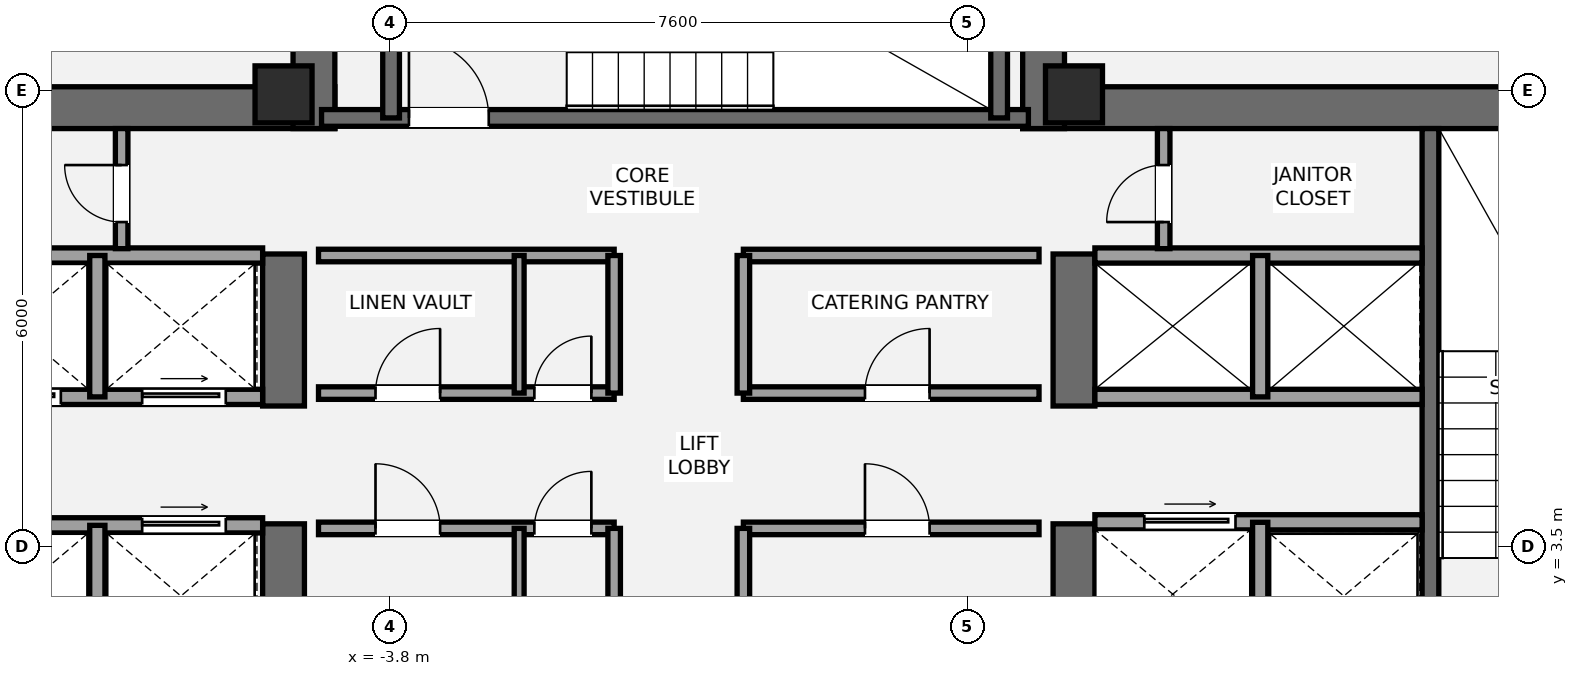
"""IFC4 building model, lengths in metres.
Left out: names, types, materials, properties, quantities, classifications, styles, units other than length and angle.
Written with IfcOpenShell. Run it as: python <this file> out.ifc"""

import sys

from ifc_helpers import new_model, si_unit, direction, frame, frame_2d, origin, origin_2d, place, context, subcontext, project, spatial, rectangle, extrude, element, fill, save


model = new_model("IFC4")
c1 = context("Model", 3, precision=1e-05, world=origin(), true_north=direction((0.0, 1.0)))
c2 = subcontext(c1, "Body", "Model", "MODEL_VIEW")
j1 = project(units=[si_unit("LENGTHUNIT", "METRE"), si_unit("PLANEANGLEUNIT", "RADIAN")], contexts=[c1])
p1 = place(None, origin())
s1 = spatial("IfcSite", under=j1, at=p1, CompositionType="ELEMENT")
p2 = place(p1, origin())
s2 = spatial("IfcBuilding", under=s1, at=p2, CompositionType="ELEMENT")
p3 = place(p2, frame((0.0, 0.0, 238.35)))
s3 = spatial("IfcBuildingStorey", under=s2, at=p3, CompositionType="ELEMENT", Elevation=238.35)
p4 = place(p3, frame((-13.7, 9.275, 0.0), z_axis=(0.0, 0.0, 1.0), x_axis=(1.0, 0.0, 0.0)))
e1 = element("IfcWall", 1, at=p4, inside=s3, PredefinedType="SHEAR", context=c2, shape_type="SweptSolid", body=[
    extrude(rectangle(XDim=9.175, YDim=0.55, at=frame_2d((4.587, 0.0))), origin(), (0.0, 0.0, 1.0), 3.15),
])
p5 = place(p3, frame((-5.2, 1.3, 0.0), z_axis=(0.0, 0.0, 1.0), x_axis=(0.0, 1.0, 0.0)))
e2 = element("IfcWall", 2, at=p5, inside=s3, PredefinedType="SHEAR", context=c2, shape_type="SweptSolid", body=[
    extrude(rectangle(XDim=2.5, YDim=0.55, at=frame_2d((1.25, 0.0))), origin(), (0.0, 0.0, 1.0), 3.15),
])
p6 = place(p3, frame((-5.2, 5.35, 0.0), z_axis=(0.0, 0.0, 1.0), x_axis=(0.0, 1.0, 0.0)))
e3 = element("IfcWall", 3, at=p6, inside=s3, PredefinedType="SHEAR", context=c2, shape_type="SweptSolid", body=[
    extrude(rectangle(XDim=2.0, YDim=0.55, at=frame_2d((1.0, 0.0))), origin(), (0.0, 0.0, 1.0), 3.15),
])
p7 = place(p3, frame((4.525, 9.275, 0.0), z_axis=(0.0, 0.0, 1.0), x_axis=(1.0, 0.0, 0.0)))
e4 = element("IfcWall", 4, at=p7, inside=s3, PredefinedType="SHEAR", context=c2, shape_type="SweptSolid", body=[
    extrude(rectangle(XDim=9.175, YDim=0.55, at=frame_2d((4.587, 0.0))), origin(), (0.0, 0.0, 1.0), 3.15),
])
p8 = place(p3, frame((5.2, 1.3, 0.0), z_axis=(0.0, 0.0, 1.0), x_axis=(0.0, 1.0, 0.0)))
e5 = element("IfcWall", 5, at=p8, inside=s3, PredefinedType="SHEAR", context=c2, shape_type="SweptSolid", body=[
    extrude(rectangle(XDim=2.5, YDim=0.55, at=frame_2d((1.25, 0.0))), origin(), (0.0, 0.0, 1.0), 3.15),
])
p9 = place(p3, frame((5.2, 5.35, 0.0), z_axis=(0.0, 0.0, 1.0), x_axis=(0.0, 1.0, 0.0)))
e6 = element("IfcWall", 6, at=p9, inside=s3, PredefinedType="SHEAR", context=c2, shape_type="SweptSolid", body=[
    extrude(rectangle(XDim=2.0, YDim=0.55, at=frame_2d((1.0, 0.0))), origin(), (0.0, 0.0, 1.0), 3.15),
])
p10 = place(p3, frame((9.89, 1.85, 0.0), z_axis=(0.0, 0.0, 1.0), x_axis=(0.0, 1.0, 0.0)))
e7 = element("IfcWall", 7, at=p10, inside=s3, PredefinedType="SHEAR", context=c2, shape_type="SweptSolid", body=[
    extrude(rectangle(XDim=7.15, YDim=0.22, at=frame_2d((3.575, 0.0))), origin(), (0.0, 0.0, 1.0), 3.15),
])
for number, where, z_axis, x_axis in (
    (8, (-4.8, 9.0, 0.0), (0.0, 0.0, 1.0), (0.0, 1.0, 0.0)),
    (9, (4.8, 9.0, 0.0), (0.0, 0.0, 1.0), (0.0, 1.0, 0.0)),
):
    element("IfcWall", number, at=place(p3, frame(where, z_axis=z_axis, x_axis=x_axis)), inside=s3, PredefinedType="SHEAR", context=c2, shape_type="SweptSolid", body=[
        extrude(rectangle(XDim=3.95, YDim=0.55, at=frame_2d((1.975, 0.0))), origin(), (0.0, 0.0, 1.0), 3.15),
    ])
p11 = place(p3, frame((-4.7, 9.14, 0.0), z_axis=(0.0, 0.0, 1.0), x_axis=(1.0, 0.0, 0.0)))
e10 = element("IfcWall", 10, at=p11, inside=s3, PredefinedType="SHEAR", context=c2, shape_type="SweptSolid", body=[
    extrude(rectangle(XDim=9.3, YDim=0.22, at=frame_2d((4.65, 0.0))), origin(), (0.0, 0.0, 1.0), 3.15),
])
p12 = place(p11, frame((1.15, 0.0, 0.0)))
e11 = element("IfcOpeningElement", 11, at=p12, cuts=e10, PredefinedType="OPENING", context=c2, shape_type="SweptSolid", body=[
    extrude(rectangle(XDim=1.05, YDim=2.15, at=frame_2d((0.525, 1.075))), frame((0.0, 0.12, 0.0), z_axis=(0.0, -1.0, 0.0), x_axis=(1.0, 0.0, 0.0)), (0.0, 0.0, 1.0), 0.24),
])
for number, where, z_axis, x_axis in (
    (12, (-3.785, 9.14, 0.0), (0.0, 0.0, 1.0), (0.0, 1.0, 0.0)),
    (13, (4.215, 9.14, 0.0), (0.0, 0.0, 1.0), (0.0, 1.0, 0.0)),
):
    element("IfcWall", number, at=place(p3, frame(where, z_axis=z_axis, x_axis=x_axis)), inside=s3, PredefinedType="SHEAR", context=c2, shape_type="SweptSolid", body=[
        extrude(rectangle(XDim=3.26, YDim=0.22, at=frame_2d((1.63, 0.0))), origin(), (0.0, 0.0, 1.0), 3.15),
    ])
for number, where, z_axis, x_axis in (
    (14, (-5.2, 9.45, 0.0), (0.0, 0.0, 1.0), (1.0, 0.0, 0.0)),
    (15, (5.2, 9.45, 0.0), (0.0, 0.0, 1.0), (1.0, 0.0, 0.0)),
):
    element("IfcColumn", number, at=place(p3, frame(where, z_axis=z_axis, x_axis=x_axis)), inside=s3, PredefinedType="PILASTER", context=c2, shape_type="SweptSolid", body=[
        extrude(rectangle(XDim=0.75, YDim=0.75, at=origin_2d()), origin(), (0.0, 0.0, 1.0), 3.15),
    ])
p13 = place(p3, frame((-9.78, 3.78, 0.0), z_axis=(0.0, 0.0, 1.0), x_axis=(1.0, 0.0, 0.0)))
e16 = element("IfcWall", 16, at=p13, inside=s3, PredefinedType="SOLIDWALL", context=c2, shape_type="SweptSolid", body=[
    extrude(rectangle(XDim=4.305, YDim=0.2, at=frame_2d((2.152, 0.0))), origin(), (0.0, 0.0, 1.0), 2.97),
])
p14 = place(p13, frame((2.72, 0.0, 0.0)))
e17 = element("IfcOpeningElement", 17, at=p14, cuts=e16, PredefinedType="OPENING", context=c2, shape_type="SweptSolid", body=[
    extrude(rectangle(XDim=1.1, YDim=2.2, at=frame_2d((0.55, 1.1))), frame((0.0, 0.11, 0.0), z_axis=(0.0, -1.0, 0.0), x_axis=(1.0, 0.0, 0.0)), (0.0, 0.0, 1.0), 0.22),
])
p15 = place(p3, frame((-7.65, 1.85, 0.0), z_axis=(0.0, 0.0, 1.0), x_axis=(0.0, 1.0, 0.0)))
e18 = element("IfcWall", 18, at=p15, inside=s3, PredefinedType="SOLIDWALL", context=c2, shape_type="SweptSolid", body=[
    extrude(rectangle(XDim=1.93, YDim=0.2, at=frame_2d((0.965, 0.0))), origin(), (0.0, 0.0, 1.0), 2.97),
])
p16 = place(p3, frame((-9.78, 5.47, 0.0), z_axis=(0.0, 0.0, 1.0), x_axis=(1.0, 0.0, 0.0)))
e19 = element("IfcWall", 19, at=p16, inside=s3, PredefinedType="SOLIDWALL", context=c2, shape_type="SweptSolid", body=[
    extrude(rectangle(XDim=4.305, YDim=0.2, at=frame_2d((2.152, 0.0))), origin(), (0.0, 0.0, 1.0), 2.97),
])
p17 = place(p16, frame((0.55, 0.0, 0.0)))
e20 = element("IfcOpeningElement", 20, at=p17, cuts=e19, PredefinedType="OPENING", context=c2, shape_type="SweptSolid", body=[
    extrude(rectangle(XDim=1.1, YDim=2.2, at=frame_2d((0.55, 1.1))), frame((0.0, 0.11, 0.0), z_axis=(0.0, -1.0, 0.0), x_axis=(1.0, 0.0, 0.0)), (0.0, 0.0, 1.0), 0.22),
])
p18 = place(p16, frame((2.72, 0.0, 0.0)))
e21 = element("IfcOpeningElement", 21, at=p18, cuts=e19, PredefinedType="OPENING", context=c2, shape_type="SweptSolid", body=[
    extrude(rectangle(XDim=1.1, YDim=2.2, at=frame_2d((0.55, 1.1))), frame((0.0, 0.11, 0.0), z_axis=(0.0, -1.0, 0.0), x_axis=(1.0, 0.0, 0.0)), (0.0, 0.0, 1.0), 0.22),
])
p19 = place(p3, frame((-9.78, 7.33, 0.0), z_axis=(0.0, 0.0, 1.0), x_axis=(1.0, 0.0, 0.0)))
e22 = element("IfcWall", 22, at=p19, inside=s3, PredefinedType="SOLIDWALL", context=c2, shape_type="SweptSolid", body=[
    extrude(rectangle(XDim=4.305, YDim=0.2, at=frame_2d((2.152, 0.0))), origin(), (0.0, 0.0, 1.0), 2.97),
])
p20 = place(p3, frame((-7.65, 5.47, 0.0), z_axis=(0.0, 0.0, 1.0), x_axis=(0.0, 1.0, 0.0)))
e23 = element("IfcWall", 23, at=p20, inside=s3, PredefinedType="SOLIDWALL", context=c2, shape_type="SweptSolid", body=[
    extrude(rectangle(XDim=1.86, YDim=0.2, at=frame_2d((0.93, 0.0))), origin(), (0.0, 0.0, 1.0), 2.97),
])
p21 = place(p3, frame((5.475, 3.82, 0.0), z_axis=(0.0, 0.0, 1.0), x_axis=(1.0, 0.0, 0.0)))
e24 = element("IfcWall", 24, at=p21, inside=s3, PredefinedType="SOLIDWALL", context=c2, shape_type="SweptSolid", body=[
    extrude(rectangle(XDim=4.305, YDim=0.2, at=frame_2d((2.152, 0.0))), origin(), (0.0, 0.0, 1.0), 2.97),
])
p22 = place(p21, frame((0.65, 0.0, 0.0)))
e25 = element("IfcOpeningElement", 25, at=p22, cuts=e24, PredefinedType="OPENING", context=c2, shape_type="SweptSolid", body=[
    extrude(rectangle(XDim=1.2, YDim=2.2, at=frame_2d((0.6, 1.1))), frame((0.0, 0.11, 0.0), z_axis=(0.0, -1.0, 0.0), x_axis=(1.0, 0.0, 0.0)), (0.0, 0.0, 1.0), 0.22),
])
p23 = place(p3, frame((7.65, 1.85, 0.0), z_axis=(0.0, 0.0, 1.0), x_axis=(0.0, 1.0, 0.0)))
e26 = element("IfcWall", 26, at=p23, inside=s3, PredefinedType="SOLIDWALL", context=c2, shape_type="SweptSolid", body=[
    extrude(rectangle(XDim=1.97, YDim=0.2, at=frame_2d((0.985, 0.0))), origin(), (0.0, 0.0, 1.0), 2.97),
])
for number, where, z_axis, x_axis in (
    (27, (5.475, 5.47, 0.0), (0.0, 0.0, 1.0), (1.0, 0.0, 0.0)),
    (28, (5.475, 7.33, 0.0), (0.0, 0.0, 1.0), (1.0, 0.0, 0.0)),
):
    element("IfcWall", number, at=place(p3, frame(where, z_axis=z_axis, x_axis=x_axis)), inside=s3, PredefinedType="SOLIDWALL", context=c2, shape_type="SweptSolid", body=[
        extrude(rectangle(XDim=4.305, YDim=0.2, at=frame_2d((2.152, 0.0))), origin(), (0.0, 0.0, 1.0), 2.97),
    ])
p24 = place(p3, frame((7.65, 5.47, 0.0), z_axis=(0.0, 0.0, 1.0), x_axis=(0.0, 1.0, 0.0)))
e29 = element("IfcWall", 29, at=p24, inside=s3, PredefinedType="SOLIDWALL", context=c2, shape_type="SweptSolid", body=[
    extrude(rectangle(XDim=1.86, YDim=0.2, at=frame_2d((0.93, 0.0))), origin(), (0.0, 0.0, 1.0), 2.97),
])
p25 = place(p3, frame((-4.74, 3.74, 0.0), z_axis=(0.0, 0.0, 1.0), x_axis=(1.0, 0.0, 0.0)))
e30 = element("IfcWall", 30, at=p25, inside=s3, PredefinedType="PARTITIONING", context=c2, shape_type="SweptSolid", body=[
    extrude(rectangle(XDim=3.89, YDim=0.165, at=frame_2d((1.945, 0.0))), origin(), (0.0, 0.0, 1.0), 2.97),
])
p26 = place(p25, frame((0.75, 0.0, 0.0)))
e31 = element("IfcOpeningElement", 31, at=p26, cuts=e30, PredefinedType="OPENING", context=c2, shape_type="SweptSolid", body=[
    extrude(rectangle(XDim=0.85, YDim=2.1, at=frame_2d((0.425, 1.05))), frame((0.0, 0.093, 0.0), z_axis=(0.0, -1.0, 0.0), x_axis=(1.0, 0.0, 0.0)), (0.0, 0.0, 1.0), 0.185),
])
p27 = place(p25, frame((2.84, 0.0, 0.0)))
e32 = element("IfcOpeningElement", 32, at=p27, cuts=e30, PredefinedType="OPENING", context=c2, shape_type="SweptSolid", body=[
    extrude(rectangle(XDim=0.75, YDim=2.1, at=frame_2d((0.375, 1.05))), frame((0.0, 0.093, 0.0), z_axis=(0.0, -1.0, 0.0), x_axis=(1.0, 0.0, 0.0)), (0.0, 0.0, 1.0), 0.185),
])
p28 = place(p3, frame((-0.85, 1.92, 0.0), z_axis=(0.0, 0.0, 1.0), x_axis=(0.0, 1.0, 0.0)))
e33 = element("IfcWall", 33, at=p28, inside=s3, PredefinedType="PARTITIONING", context=c2, shape_type="SweptSolid", body=[
    extrude(rectangle(XDim=1.82, YDim=0.165, at=frame_2d((0.91, 0.0))), origin(), (0.0, 0.0, 1.0), 2.97),
])
p29 = place(p3, frame((0.85, 3.74, 0.0), z_axis=(0.0, 0.0, 1.0), x_axis=(1.0, 0.0, 0.0)))
e34 = element("IfcWall", 34, at=p29, inside=s3, PredefinedType="PARTITIONING", context=c2, shape_type="SweptSolid", body=[
    extrude(rectangle(XDim=3.89, YDim=0.165, at=frame_2d((1.945, 0.0))), origin(), (0.0, 0.0, 1.0), 2.97),
])
p30 = place(p29, frame((1.6, 0.0, 0.0)))
e35 = element("IfcOpeningElement", 35, at=p30, cuts=e34, PredefinedType="OPENING", context=c2, shape_type="SweptSolid", body=[
    extrude(rectangle(XDim=0.85, YDim=2.1, at=frame_2d((0.425, 1.05))), frame((0.0, 0.093, 0.0), z_axis=(0.0, -1.0, 0.0), x_axis=(1.0, 0.0, 0.0)), (0.0, 0.0, 1.0), 0.185),
])
p31 = place(p3, frame((0.85, 1.92, 0.0), z_axis=(0.0, 0.0, 1.0), x_axis=(0.0, 1.0, 0.0)))
e36 = element("IfcWall", 36, at=p31, inside=s3, PredefinedType="PARTITIONING", context=c2, shape_type="SweptSolid", body=[
    extrude(rectangle(XDim=1.82, YDim=0.165, at=frame_2d((0.91, 0.0))), origin(), (0.0, 0.0, 1.0), 2.97),
])
p32 = place(p3, frame((-2.1, 1.92, 0.0), z_axis=(0.0, 0.0, 1.0), x_axis=(0.0, 1.0, 0.0)))
e37 = element("IfcWall", 37, at=p32, inside=s3, PredefinedType="PARTITIONING", context=c2, shape_type="SweptSolid", body=[
    extrude(rectangle(XDim=1.82, YDim=0.13, at=frame_2d((0.91, 0.0))), origin(), (0.0, 0.0, 1.0), 2.97),
])
p33 = place(p3, frame((-4.74, 5.52, 0.0), z_axis=(0.0, 0.0, 1.0), x_axis=(1.0, 0.0, 0.0)))
e38 = element("IfcWall", 38, at=p33, inside=s3, PredefinedType="PARTITIONING", context=c2, shape_type="SweptSolid", body=[
    extrude(rectangle(XDim=3.89, YDim=0.165, at=frame_2d((1.945, 0.0))), origin(), (0.0, 0.0, 1.0), 2.97),
])
p34 = place(p33, frame((0.75, 0.0, 0.0)))
e39 = element("IfcOpeningElement", 39, at=p34, cuts=e38, PredefinedType="OPENING", context=c2, shape_type="SweptSolid", body=[
    extrude(rectangle(XDim=0.85, YDim=2.1, at=frame_2d((0.425, 1.05))), frame((0.0, 0.093, 0.0), z_axis=(0.0, -1.0, 0.0), x_axis=(1.0, 0.0, 0.0)), (0.0, 0.0, 1.0), 0.185),
])
p35 = place(p33, frame((2.84, 0.0, 0.0)))
e40 = element("IfcOpeningElement", 40, at=p35, cuts=e38, PredefinedType="OPENING", context=c2, shape_type="SweptSolid", body=[
    extrude(rectangle(XDim=0.75, YDim=2.1, at=frame_2d((0.375, 1.05))), frame((0.0, 0.093, 0.0), z_axis=(0.0, -1.0, 0.0), x_axis=(1.0, 0.0, 0.0)), (0.0, 0.0, 1.0), 0.185),
])
p36 = place(p3, frame((-4.74, 7.33, 0.0), z_axis=(0.0, 0.0, 1.0), x_axis=(1.0, 0.0, 0.0)))
e41 = element("IfcWall", 41, at=p36, inside=s3, PredefinedType="PARTITIONING", context=c2, shape_type="SweptSolid", body=[
    extrude(rectangle(XDim=3.89, YDim=0.165, at=frame_2d((1.945, 0.0))), origin(), (0.0, 0.0, 1.0), 2.97),
])
p37 = place(p3, frame((-0.85, 5.52, 0.0), z_axis=(0.0, 0.0, 1.0), x_axis=(0.0, 1.0, 0.0)))
e42 = element("IfcWall", 42, at=p37, inside=s3, PredefinedType="PARTITIONING", context=c2, shape_type="SweptSolid", body=[
    extrude(rectangle(XDim=1.81, YDim=0.165, at=frame_2d((0.905, 0.0))), origin(), (0.0, 0.0, 1.0), 2.97),
])
p38 = place(p3, frame((0.85, 5.52, 0.0), z_axis=(0.0, 0.0, 1.0), x_axis=(1.0, 0.0, 0.0)))
e43 = element("IfcWall", 43, at=p38, inside=s3, PredefinedType="PARTITIONING", context=c2, shape_type="SweptSolid", body=[
    extrude(rectangle(XDim=3.89, YDim=0.165, at=frame_2d((1.945, 0.0))), origin(), (0.0, 0.0, 1.0), 2.97),
])
p39 = place(p38, frame((1.6, 0.0, 0.0)))
e44 = element("IfcOpeningElement", 44, at=p39, cuts=e43, PredefinedType="OPENING", context=c2, shape_type="SweptSolid", body=[
    extrude(rectangle(XDim=0.85, YDim=2.1, at=frame_2d((0.425, 1.05))), frame((0.0, 0.093, 0.0), z_axis=(0.0, -1.0, 0.0), x_axis=(1.0, 0.0, 0.0)), (0.0, 0.0, 1.0), 0.185),
])
p40 = place(p3, frame((0.85, 7.33, 0.0), z_axis=(0.0, 0.0, 1.0), x_axis=(1.0, 0.0, 0.0)))
e45 = element("IfcWall", 45, at=p40, inside=s3, PredefinedType="PARTITIONING", context=c2, shape_type="SweptSolid", body=[
    extrude(rectangle(XDim=3.89, YDim=0.165, at=frame_2d((1.945, 0.0))), origin(), (0.0, 0.0, 1.0), 2.97),
])
p41 = place(p3, frame((0.85, 5.52, 0.0), z_axis=(0.0, 0.0, 1.0), x_axis=(0.0, 1.0, 0.0)))
e46 = element("IfcWall", 46, at=p41, inside=s3, PredefinedType="PARTITIONING", context=c2, shape_type="SweptSolid", body=[
    extrude(rectangle(XDim=1.81, YDim=0.165, at=frame_2d((0.905, 0.0))), origin(), (0.0, 0.0, 1.0), 2.97),
])
p42 = place(p3, frame((-2.1, 5.52, 0.0), z_axis=(0.0, 0.0, 1.0), x_axis=(0.0, 1.0, 0.0)))
e47 = element("IfcWall", 47, at=p42, inside=s3, PredefinedType="PARTITIONING", context=c2, shape_type="SweptSolid", body=[
    extrude(rectangle(XDim=1.81, YDim=0.13, at=frame_2d((0.905, 0.0))), origin(), (0.0, 0.0, 1.0), 2.97),
])
p43 = place(p3, frame((-7.33, 7.42, 0.0), z_axis=(0.0, 0.0, 1.0), x_axis=(0.0, 1.0, 0.0)))
e48 = element("IfcWall", 48, at=p43, inside=s3, PredefinedType="PARTITIONING", context=c2, shape_type="SweptSolid", body=[
    extrude(rectangle(XDim=1.58, YDim=0.165, at=frame_2d((0.79, 0.0))), origin(), (0.0, 0.0, 1.0), 2.97),
])
p44 = place(p43, frame((0.35, 0.0, 0.0)))
e49 = element("IfcOpeningElement", 49, at=p44, cuts=e48, PredefinedType="OPENING", context=c2, shape_type="SweptSolid", body=[
    extrude(rectangle(XDim=0.75, YDim=2.1, at=frame_2d((0.375, 1.05))), frame((0.0, 0.093, 0.0), z_axis=(0.0, -1.0, 0.0), x_axis=(1.0, 0.0, 0.0)), (0.0, 0.0, 1.0), 0.185),
])
p45 = place(p3, frame((6.38, 7.42, 0.0), z_axis=(0.0, 0.0, 1.0), x_axis=(0.0, 1.0, 0.0)))
e50 = element("IfcWall", 50, at=p45, inside=s3, PredefinedType="PARTITIONING", context=c2, shape_type="SweptSolid", body=[
    extrude(rectangle(XDim=1.58, YDim=0.165, at=frame_2d((0.79, 0.0))), origin(), (0.0, 0.0, 1.0), 2.97),
])
p46 = place(p45, frame((0.35, 0.0, 0.0)))
e51 = element("IfcOpeningElement", 51, at=p46, cuts=e50, PredefinedType="OPENING", context=c2, shape_type="SweptSolid", body=[
    extrude(rectangle(XDim=0.75, YDim=2.1, at=frame_2d((0.375, 1.05))), frame((0.0, 0.093, 0.0), z_axis=(0.0, -1.0, 0.0), x_axis=(1.0, 0.0, 0.0)), (0.0, 0.0, 1.0), 0.185),
])
p47 = place(p12, origin())
e52 = element("IfcDoor", 52, at=p47, inside=s3, OperationType="SINGLE_SWING_LEFT", PredefinedType="DOOR", context=c2, shape_type="SweptSolid", body=[
    extrude(rectangle(XDim=1.05, YDim=2.15, at=frame_2d((0.525, 1.075))), frame((0.0, 0.025, 0.0), z_axis=(0.0, -1.0, 0.0), x_axis=(1.0, 0.0, 0.0)), (0.0, 0.0, 1.0), 0.05),
])
fill(e11, e52)
p48 = place(p17, origin())
e53 = element("IfcDoor", 53, at=p48, inside=s3, OperationType="SLIDING_TO_LEFT", PredefinedType="DOOR", context=c2, shape_type="SweptSolid", body=[
    extrude(rectangle(XDim=1.1, YDim=2.2, at=frame_2d((0.55, 1.1))), frame((0.0, 0.025, 0.0), z_axis=(0.0, -1.0, 0.0), x_axis=(1.0, 0.0, 0.0)), (0.0, 0.0, 1.0), 0.05),
])
fill(e20, e53)
p49 = place(p18, origin())
e54 = element("IfcDoor", 54, at=p49, inside=s3, OperationType="SLIDING_TO_LEFT", PredefinedType="DOOR", context=c2, shape_type="SweptSolid", body=[
    extrude(rectangle(XDim=1.1, YDim=2.2, at=frame_2d((0.55, 1.1))), frame((0.0, 0.025, 0.0), z_axis=(0.0, -1.0, 0.0), x_axis=(1.0, 0.0, 0.0)), (0.0, 0.0, 1.0), 0.05),
])
fill(e21, e54)
p50 = place(p14, origin())
e55 = element("IfcDoor", 55, at=p50, inside=s3, OperationType="SLIDING_TO_LEFT", PredefinedType="DOOR", context=c2, shape_type="SweptSolid", body=[
    extrude(rectangle(XDim=1.1, YDim=2.2, at=frame_2d((0.55, 1.1))), frame((0.0, 0.025, 0.0), z_axis=(0.0, -1.0, 0.0), x_axis=(1.0, 0.0, 0.0)), (0.0, 0.0, 1.0), 0.05),
])
fill(e17, e55)
p51 = place(p22, origin())
e56 = element("IfcDoor", 56, at=p51, inside=s3, OperationType="SLIDING_TO_RIGHT", PredefinedType="DOOR", context=c2, shape_type="SweptSolid", body=[
    extrude(rectangle(XDim=1.2, YDim=2.2, at=frame_2d((0.6, 1.1))), frame((0.0, 0.025, 0.0), z_axis=(0.0, -1.0, 0.0), x_axis=(1.0, 0.0, 0.0)), (0.0, 0.0, 1.0), 0.05),
])
fill(e25, e56)
p52 = place(p26, origin())
e57 = element("IfcDoor", 57, at=p52, inside=s3, OperationType="SINGLE_SWING_LEFT", PredefinedType="DOOR", context=c2, shape_type="SweptSolid", body=[
    extrude(rectangle(XDim=0.85, YDim=2.1, at=frame_2d((0.425, 1.05))), frame((0.0, 0.025, 0.0), z_axis=(0.0, -1.0, 0.0), x_axis=(1.0, 0.0, 0.0)), (0.0, 0.0, 1.0), 0.05),
])
fill(e31, e57)
p53 = place(p27, origin())
e58 = element("IfcDoor", 58, at=p53, inside=s3, OperationType="SINGLE_SWING_RIGHT", PredefinedType="DOOR", context=c2, shape_type="SweptSolid", body=[
    extrude(rectangle(XDim=0.75, YDim=2.1, at=frame_2d((0.375, 1.05))), frame((0.0, 0.025, 0.0), z_axis=(0.0, -1.0, 0.0), x_axis=(1.0, 0.0, 0.0)), (0.0, 0.0, 1.0), 0.05),
])
fill(e32, e58)
p54 = place(p30, origin())
e59 = element("IfcDoor", 59, at=p54, inside=s3, OperationType="SINGLE_SWING_LEFT", PredefinedType="DOOR", context=c2, shape_type="SweptSolid", body=[
    extrude(rectangle(XDim=0.85, YDim=2.1, at=frame_2d((0.425, 1.05))), frame((0.0, 0.025, 0.0), z_axis=(0.0, -1.0, 0.0), x_axis=(1.0, 0.0, 0.0)), (0.0, 0.0, 1.0), 0.05),
])
fill(e35, e59)
p55 = place(p34, origin())
e60 = element("IfcDoor", 60, at=p55, inside=s3, OperationType="SINGLE_SWING_RIGHT", PredefinedType="DOOR", context=c2, shape_type="SweptSolid", body=[
    extrude(rectangle(XDim=0.85, YDim=2.1, at=frame_2d((0.425, 1.05))), frame((0.0, 0.025, 0.0), z_axis=(0.0, -1.0, 0.0), x_axis=(1.0, 0.0, 0.0)), (0.0, 0.0, 1.0), 0.05),
])
fill(e39, e60)
p56 = place(p35, origin())
e61 = element("IfcDoor", 61, at=p56, inside=s3, OperationType="SINGLE_SWING_RIGHT", PredefinedType="DOOR", context=c2, shape_type="SweptSolid", body=[
    extrude(rectangle(XDim=0.75, YDim=2.1, at=frame_2d((0.375, 1.05))), frame((0.0, 0.025, 0.0), z_axis=(0.0, -1.0, 0.0), x_axis=(1.0, 0.0, 0.0)), (0.0, 0.0, 1.0), 0.05),
])
fill(e40, e61)
p57 = place(p39, origin())
e62 = element("IfcDoor", 62, at=p57, inside=s3, OperationType="SINGLE_SWING_RIGHT", PredefinedType="DOOR", context=c2, shape_type="SweptSolid", body=[
    extrude(rectangle(XDim=0.85, YDim=2.1, at=frame_2d((0.425, 1.05))), frame((0.0, 0.025, 0.0), z_axis=(0.0, -1.0, 0.0), x_axis=(1.0, 0.0, 0.0)), (0.0, 0.0, 1.0), 0.05),
])
fill(e44, e62)
p58 = place(p44, origin())
e63 = element("IfcDoor", 63, at=p58, inside=s3, OperationType="SINGLE_SWING_RIGHT", PredefinedType="DOOR", context=c2, shape_type="SweptSolid", body=[
    extrude(rectangle(XDim=0.75, YDim=2.1, at=frame_2d((0.375, 1.05))), frame((0.0, 0.025, 0.0), z_axis=(0.0, -1.0, 0.0), x_axis=(1.0, 0.0, 0.0)), (0.0, 0.0, 1.0), 0.05),
])
fill(e49, e63)
p59 = place(p46, origin())
e64 = element("IfcDoor", 64, at=p59, inside=s3, OperationType="SINGLE_SWING_LEFT", PredefinedType="DOOR", context=c2, shape_type="SweptSolid", body=[
    extrude(rectangle(XDim=0.75, YDim=2.1, at=frame_2d((0.375, 1.05))), frame((0.0, 0.025, 0.0), z_axis=(0.0, -1.0, 0.0), x_axis=(1.0, 0.0, 0.0)), (0.0, 0.0, 1.0), 0.05),
])
fill(e51, e64)
save(model, sys.argv[1])
